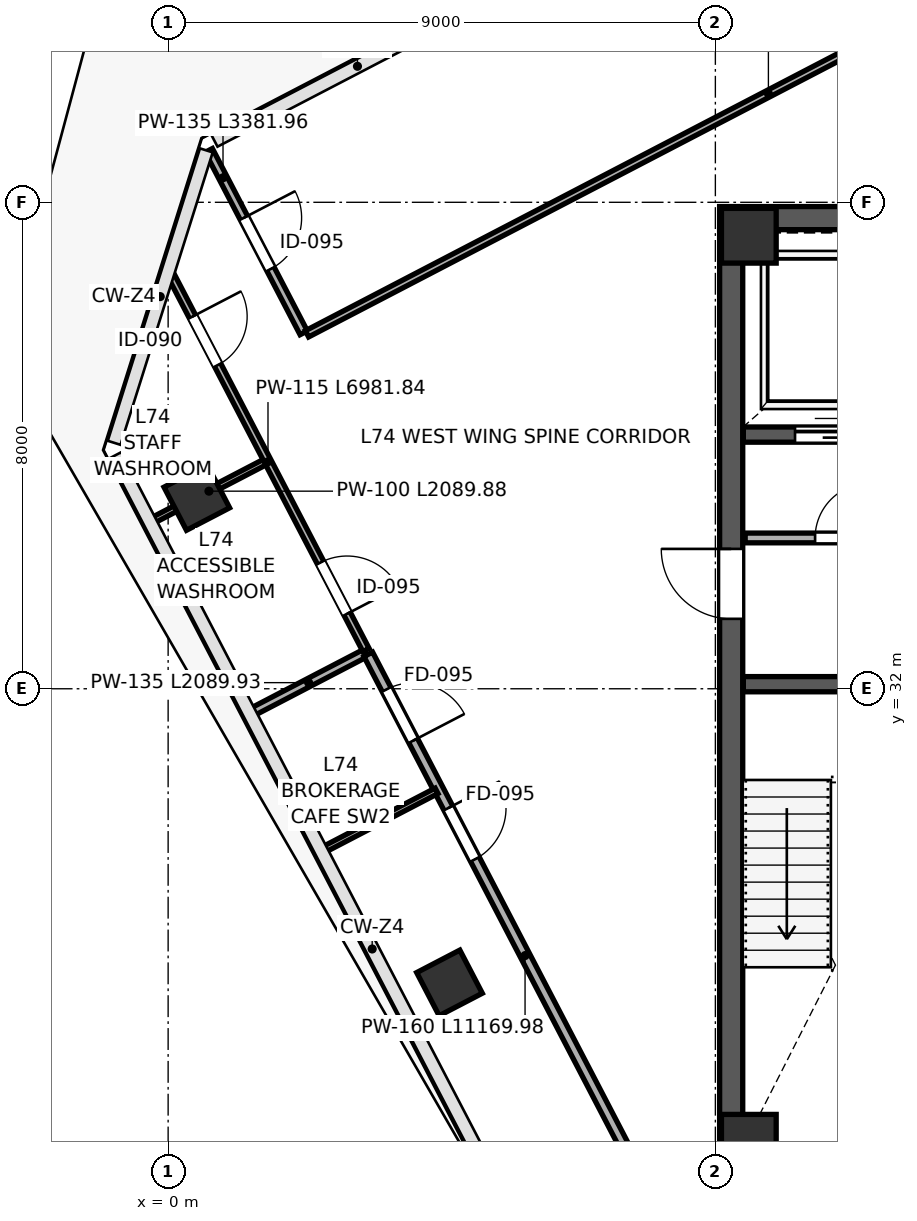
"""IFC4 building model, lengths in metres.
Left out: names, types, materials, properties, quantities, classifications, styles, units other than length and angle.
Written with IfcOpenShell. Run it as: python <this file> out.ifc"""

import sys

from ifc_helpers import new_model, si_unit, direction, frame, frame_2d, origin, origin_2d, place, context, subcontext, project, spatial, rectangle, extrude, source, transform, mapped, element, fill, save


model = new_model("IFC4")
c1 = context("Model", 3, precision=1e-05, world=origin(), true_north=direction((0.0, 1.0)))
c2 = subcontext(c1, "Body", "Model", "MODEL_VIEW")
j1 = project(units=[si_unit("LENGTHUNIT", "METRE"), si_unit("PLANEANGLEUNIT", "RADIAN")], contexts=[c1])
p1 = place(None, origin())
s1 = spatial("IfcSite", under=j1, at=p1, CompositionType="ELEMENT")
p2 = place(p1, origin())
s2 = spatial("IfcBuilding", under=s1, at=p2, CompositionType="ELEMENT")
p3 = place(p2, frame((0.0, 0.0, 328.2)))
s3 = spatial("IfcBuildingStorey", under=s2, at=p3, CompositionType="ELEMENT", Elevation=328.2)
m1 = source(origin(), c2, "Body", "SweptSolid", [
    extrude(rectangle(XDim=0.9, YDim=0.9, at=origin_2d()), origin(), (0.0, 0.0, 1.0), 4.198),
])
for number, where, z_axis, x_axis in (
    (1, (9.55, 24.55, 0.001), (0.0, 0.0, 1.0), (1.0, 0.0, 0.0)),
    (2, (9.55, 39.45, 0.001), (0.0, 0.0, 1.0), (1.0, 0.0, 0.0)),
):
    element("IfcColumn", number, at=place(p3, frame(where, z_axis=z_axis, x_axis=x_axis)), inside=s3, PredefinedType="COLUMN", context=c2, shape_type="MappedRepresentation", body=[
        mapped(m1, transform((0.0, 0.0, 0.0), scale=1.0)),
    ])
m2 = source(origin(), c2, "Body", "SweptSolid", [
    extrude(rectangle(XDim=0.8, YDim=0.8, at=origin_2d()), origin(), (0.0, 0.0, 1.0), 4.198),
])
for number, where, z_axis, x_axis in (
    (3, (0.472, 35.146, 0.001), (0.0, 0.0, 1.0), (-0.462, 0.887, 0.0)),
    (4, (4.627, 27.163, 0.001), (0.0, 0.0, 1.0), (-0.462, 0.887, 0.0)),
):
    element("IfcColumn", number, at=place(p3, frame(where, z_axis=z_axis, x_axis=x_axis)), inside=s3, PredefinedType="COLUMN", context=c2, shape_type="MappedRepresentation", body=[
        mapped(m2, transform((0.0, 0.0, 0.0), scale=1.0)),
    ])
p4 = place(p3, frame((9.26, 24.45, 0.0), z_axis=(0.0, 0.0, 1.0), x_axis=(0.0, 1.0, 0.0)))
e5 = element("IfcWall", 5, at=p4, inside=s3, PredefinedType="SHEAR", context=c2, shape_type="SweptSolid", body=[
    extrude(rectangle(XDim=15.1, YDim=0.38, at=frame_2d((7.55, 0.0))), origin(), (0.0, 0.0, 1.0), 3.96),
])
p5 = place(p4, frame((8.7, 0.0, 0.0)))
e6 = element("IfcOpeningElement", 6, at=p5, cuts=e5, PredefinedType="OPENING", context=c2, shape_type="SweptSolid", body=[
    extrude(rectangle(XDim=1.15, YDim=2.2, at=frame_2d((0.575, 1.1))), frame((0.0, 0.2, 0.0), z_axis=(0.0, -1.0, 0.0), x_axis=(1.0, 0.0, 0.0)), (0.0, 0.0, 1.0), 0.4),
])
p6 = place(p3, frame((9.07, 39.74, 0.0), z_axis=(0.0, 0.0, 1.0), x_axis=(1.0, 0.0, 0.0)))
e7 = element("IfcWall", 7, at=p6, inside=s3, PredefinedType="SHEAR", context=c2, shape_type="SweptSolid", body=[
    extrude(rectangle(XDim=17.86, YDim=0.38, at=frame_2d((8.93, 0.0))), origin(), (0.0, 0.0, 1.0), 3.96),
])
p7 = place(p3, frame((9.46, 32.075, 0.0), z_axis=(0.0, 0.0, 1.0), x_axis=(1.0, 0.0, 0.0)))
e8 = element("IfcWall", 8, at=p7, inside=s3, PredefinedType="SHEAR", context=c2, shape_type="SweptSolid", body=[
    extrude(rectangle(XDim=3.29, YDim=0.25, at=frame_2d((1.645, 0.0))), origin(), (0.0, 0.0, 1.0), 3.96),
])
p8 = place(p3, frame((9.46, 36.18, 0.0), z_axis=(0.0, 0.0, 1.0), x_axis=(1.0, 0.0, 0.0)))
e9 = element("IfcWall", 9, at=p8, inside=s3, PredefinedType="SHEAR", context=c2, shape_type="SweptSolid", body=[
    extrude(rectangle(XDim=3.79, YDim=0.25, at=frame_2d((1.895, 0.0))), origin(), (0.0, 0.0, 1.0), 3.96),
])
p9 = place(p8, frame((2.62, 0.0, 0.0)))
e10 = element("IfcOpeningElement", 10, at=p9, cuts=e9, PredefinedType="OPENING", context=c2, shape_type="SweptSolid", body=[
    extrude(rectangle(XDim=0.85, YDim=2.1, at=frame_2d((0.425, 1.05))), frame((0.0, 0.135, 0.0), z_axis=(0.0, -1.0, 0.0), x_axis=(1.0, 0.0, 0.0)), (0.0, 0.0, 1.0), 0.27),
])
p10 = place(p8, frame((0.85, 0.0, 0.0)))
e11 = element("IfcOpeningElement", 11, at=p10, cuts=e9, PredefinedType="OPENING", context=c2, shape_type="SweptSolid", body=[
    extrude(rectangle(XDim=1.3, YDim=2.25, at=frame_2d((0.65, 1.125))), frame((0.0, 0.135, 0.0), z_axis=(0.0, -1.0, 0.0), x_axis=(1.0, 0.0, 0.0)), (0.0, 0.0, 1.0), 0.27),
])
p11 = place(p3, frame((9.49, 34.48, 0.0), z_axis=(0.0, 0.0, 1.0), x_axis=(1.0, 0.0, 0.0)))
e12 = element("IfcWall", 12, at=p11, inside=s3, PredefinedType="PARTITIONING", context=c2, shape_type="SweptSolid", body=[
    extrude(rectangle(XDim=3.7, YDim=0.16, at=frame_2d((1.85, 0.0))), origin(), (0.0, 0.0, 1.0), 3.96),
])
p12 = place(p11, frame((1.15, 0.0, 0.0)))
e13 = element("IfcOpeningElement", 13, at=p12, cuts=e12, PredefinedType="OPENING", context=c2, shape_type="SweptSolid", body=[
    extrude(rectangle(XDim=0.9, YDim=2.15, at=frame_2d((0.45, 1.075))), frame((0.0, 0.09, 0.0), z_axis=(0.0, -1.0, 0.0), x_axis=(1.0, 0.0, 0.0)), (0.0, 0.0, 1.0), 0.18),
])
p13 = place(p3, frame((-0.256, 34.767, 0.0), z_axis=(0.0, 0.0, 1.0), x_axis=(0.887042679543, 0.461687431786, 0.0)))
e14 = element("IfcWall", 14, at=p13, inside=s3, PredefinedType="PARTITIONING", context=c2, shape_type="SweptSolid", body=[
    extrude(rectangle(XDim=2.09, YDim=0.1, at=frame_2d((1.045, 0.0))), origin(), (0.0, 0.0, 1.0), 3.295),
])
p14 = place(p3, frame((1.383, 31.618, 0.0), z_axis=(0.0, 0.0, 1.0), x_axis=(0.887067577271, 0.461639592491, 0.0)))
e15 = element("IfcWall", 15, at=p14, inside=s3, PredefinedType="PARTITIONING", context=c2, shape_type="SweptSolid", body=[
    extrude(rectangle(XDim=2.09, YDim=0.135, at=frame_2d((1.045, 0.0))), origin(), (0.0, 0.0, 1.0), 3.295),
])
p15 = place(p3, frame((0.031, 38.83, 0.0), z_axis=(0.0, 0.0, 1.0), x_axis=(0.461729249278, -0.887020913147, 0.0)))
e16 = element("IfcWall", 16, at=p15, inside=s3, PredefinedType="PARTITIONING", context=c2, shape_type="SweptSolid", body=[
    extrude(rectangle(XDim=6.982, YDim=0.115, at=frame_2d((3.491, 0.0))), origin(), (0.0, 0.0, 1.0), 3.96),
])
p16 = place(p15, frame((0.8, 0.0, 0.0)))
e17 = element("IfcOpeningElement", 17, at=p16, cuts=e16, PredefinedType="OPENING", context=c2, shape_type="SweptSolid", body=[
    extrude(rectangle(XDim=0.9, YDim=2.15, at=frame_2d((0.45, 1.075))), frame((0.0, 0.067, 0.0), z_axis=(0.0, -1.0, 0.0), x_axis=(1.0, 0.0, 0.0)), (0.0, 0.0, 1.0), 0.135),
])
p17 = place(p15, frame((5.36, 0.0, 0.0)))
e18 = element("IfcOpeningElement", 18, at=p17, cuts=e16, PredefinedType="OPENING", context=c2, shape_type="SweptSolid", body=[
    extrude(rectangle(XDim=0.95, YDim=2.15, at=frame_2d((0.475, 1.075))), frame((0.0, 0.067, 0.0), z_axis=(0.0, -1.0, 0.0), x_axis=(1.0, 0.0, 0.0)), (0.0, 0.0, 1.0), 0.135),
])
p18 = place(p3, frame((3.291, 32.566, 0.0), z_axis=(0.0, 0.0, 1.0), x_axis=(0.461745644878, -0.887012378401, 0.0)))
e19 = element("IfcWall", 19, at=p18, inside=s3, PredefinedType="PARTITIONING", context=c2, shape_type="SweptSolid", body=[
    extrude(rectangle(XDim=11.17, YDim=0.16, at=frame_2d((5.585, 0.0))), origin(), (0.0, 0.0, 1.0), 3.96),
])
p19 = place(p18, frame((0.65, 0.0, 0.0)))
e20 = element("IfcOpeningElement", 20, at=p19, cuts=e19, PredefinedType="OPENING", context=c2, shape_type="SweptSolid", body=[
    extrude(rectangle(XDim=0.95, YDim=2.15, at=frame_2d((0.475, 1.075))), frame((0.0, 0.09, 0.0), z_axis=(0.0, -1.0, 0.0), x_axis=(1.0, 0.0, 0.0)), (0.0, 0.0, 1.0), 0.18),
])
p20 = place(p18, frame((2.85, 0.0, 0.0)))
e21 = element("IfcOpeningElement", 21, at=p20, cuts=e19, PredefinedType="OPENING", context=c2, shape_type="SweptSolid", body=[
    extrude(rectangle(XDim=0.95, YDim=2.15, at=frame_2d((0.475, 1.075))), frame((0.0, 0.09, 0.0), z_axis=(0.0, -1.0, 0.0), x_axis=(1.0, 0.0, 0.0)), (0.0, 0.0, 1.0), 0.18),
])
p21 = place(p3, frame((2.561, 29.356, 0.0), z_axis=(0.0, 0.0, 1.0), x_axis=(0.887019740079, 0.461731502835, 0.0)))
e22 = element("IfcWall", 22, at=p21, inside=s3, PredefinedType="PARTITIONING", context=c2, shape_type="SweptSolid", body=[
    extrude(rectangle(XDim=2.09, YDim=0.1, at=frame_2d((1.045, 0.0))), origin(), (0.0, 0.0, 1.0), 3.295),
])
p22 = place(p3, frame((0.668, 40.853, 0.0), z_axis=(0.0, 0.0, 1.0), x_axis=(0.461736835827, -0.887016964009, 0.0)))
e23 = element("IfcWall", 23, at=p22, inside=s3, PredefinedType="PARTITIONING", context=c2, shape_type="SweptSolid", body=[
    extrude(rectangle(XDim=3.382, YDim=0.135, at=frame_2d((1.691, 0.0))), origin(), (0.0, 0.0, 1.0), 3.96),
])
p23 = place(p22, frame((1.25, 0.0, 0.0)))
e24 = element("IfcOpeningElement", 24, at=p23, cuts=e23, PredefinedType="OPENING", context=c2, shape_type="SweptSolid", body=[
    extrude(rectangle(XDim=0.95, YDim=2.15, at=frame_2d((0.475, 1.075))), frame((0.0, 0.078, 0.0), z_axis=(0.0, -1.0, 0.0), x_axis=(1.0, 0.0, 0.0)), (0.0, 0.0, 1.0), 0.155),
])
p24 = place(p3, frame((2.284, 37.836, 0.0), z_axis=(0.0, 0.0, 1.0), x_axis=(0.887016973522, 0.461736817553, 0.0)))
e25 = element("IfcWall", 25, at=p24, inside=s3, PredefinedType="PARTITIONING", context=c2, shape_type="SweptSolid", body=[
    extrude(rectangle(XDim=17.11, YDim=0.115, at=frame_2d((8.555, 0.0))), origin(), (0.0, 0.0, 1.0), 3.96),
])
m3 = source(origin(), c2, "Body", "SweptSolid", [
    extrude(rectangle(XDim=1.15, YDim=2.2, at=frame_2d((0.575, 1.1))), frame((0.0, 0.025, 0.0), z_axis=(0.0, -1.0, 0.0), x_axis=(1.0, 0.0, 0.0)), (0.0, 0.0, 1.0), 0.05),
])
p25 = place(p5, origin())
e26 = element("IfcDoor", 26, at=p25, inside=s3, OperationType="SINGLE_SWING_RIGHT", PredefinedType="DOOR", context=c2, shape_type="MappedRepresentation", body=[
    mapped(m3, transform((0.0, 0.0, 0.0), scale=1.0)),
])
fill(e6, e26)
m4 = source(origin(), c2, "Body", "SweptSolid", [
    extrude(rectangle(XDim=1.3, YDim=2.25, at=frame_2d((0.65, 1.125))), frame((0.0, 0.025, 0.0), z_axis=(0.0, -1.0, 0.0), x_axis=(1.0, 0.0, 0.0)), (0.0, 0.0, 1.0), 0.05),
])
p26 = place(p10, origin())
e27 = element("IfcDoor", 27, at=p26, inside=s3, OperationType="SLIDING_TO_LEFT", PredefinedType="DOOR", context=c2, shape_type="MappedRepresentation", body=[
    mapped(m4, transform((0.0, 0.0, 0.0), scale=1.0)),
])
fill(e11, e27)
m5 = source(origin(), c2, "Body", "SweptSolid", [
    extrude(rectangle(XDim=0.9, YDim=2.15, at=frame_2d((0.45, 1.075))), frame((0.0, 0.025, 0.0), z_axis=(0.0, -1.0, 0.0), x_axis=(1.0, 0.0, 0.0)), (0.0, 0.0, 1.0), 0.05),
])
p27 = place(p12, origin())
e28 = element("IfcDoor", 28, at=p27, inside=s3, OperationType="SINGLE_SWING_RIGHT", PredefinedType="DOOR", context=c2, shape_type="MappedRepresentation", body=[
    mapped(m5, transform((0.0, 0.0, 0.0), scale=1.0)),
])
fill(e13, e28)
m6 = source(origin(), c2, "Body", "SweptSolid", [
    extrude(rectangle(XDim=0.9, YDim=2.15, at=frame_2d((0.45, 1.075))), frame((0.0, 0.025, 0.0), z_axis=(0.0, -1.0, 0.0), x_axis=(1.0, 0.0, 0.0)), (0.0, 0.0, 1.0), 0.05),
])
p28 = place(p16, origin())
e29 = element("IfcDoor", 29, at=p28, inside=s3, OperationType="SINGLE_SWING_LEFT", PredefinedType="DOOR", context=c2, shape_type="MappedRepresentation", body=[
    mapped(m6, transform((0.0, 0.0, 0.0), scale=1.0)),
])
fill(e17, e29)
m7 = source(origin(), c2, "Body", "SweptSolid", [
    extrude(rectangle(XDim=0.95, YDim=2.15, at=frame_2d((0.475, 1.075))), frame((0.0, 0.025, 0.0), z_axis=(0.0, -1.0, 0.0), x_axis=(1.0, 0.0, 0.0)), (0.0, 0.0, 1.0), 0.05),
])
p29 = place(p17, origin())
e30 = element("IfcDoor", 30, at=p29, inside=s3, OperationType="SINGLE_SWING_RIGHT", PredefinedType="DOOR", context=c2, shape_type="MappedRepresentation", body=[
    mapped(m7, transform((0.0, 0.0, 0.0), scale=1.0)),
])
fill(e18, e30)
m8 = source(origin(), c2, "Body", "SweptSolid", [
    extrude(rectangle(XDim=0.95, YDim=2.15, at=frame_2d((0.475, 1.075))), frame((0.0, 0.025, 0.0), z_axis=(0.0, -1.0, 0.0), x_axis=(1.0, 0.0, 0.0)), (0.0, 0.0, 1.0), 0.05),
])
p30 = place(p19, origin())
e31 = element("IfcDoor", 31, at=p30, inside=s3, OperationType="SINGLE_SWING_RIGHT", PredefinedType="DOOR", context=c2, shape_type="MappedRepresentation", body=[
    mapped(m8, transform((0.0, 0.0, 0.0), scale=1.0)),
])
fill(e20, e31)
p31 = place(p20, origin())
e32 = element("IfcDoor", 32, at=p31, inside=s3, OperationType="SINGLE_SWING_LEFT", PredefinedType="DOOR", context=c2, shape_type="MappedRepresentation", body=[
    mapped(m8, transform((0.0, 0.0, 0.0), scale=1.0)),
])
fill(e21, e32)
p32 = place(p23, origin())
e33 = element("IfcDoor", 33, at=p32, inside=s3, OperationType="SINGLE_SWING_LEFT", PredefinedType="DOOR", context=c2, shape_type="MappedRepresentation", body=[
    mapped(m7, transform((0.0, 0.0, 0.0), scale=1.0)),
])
fill(e24, e33)
save(model, sys.argv[1])
